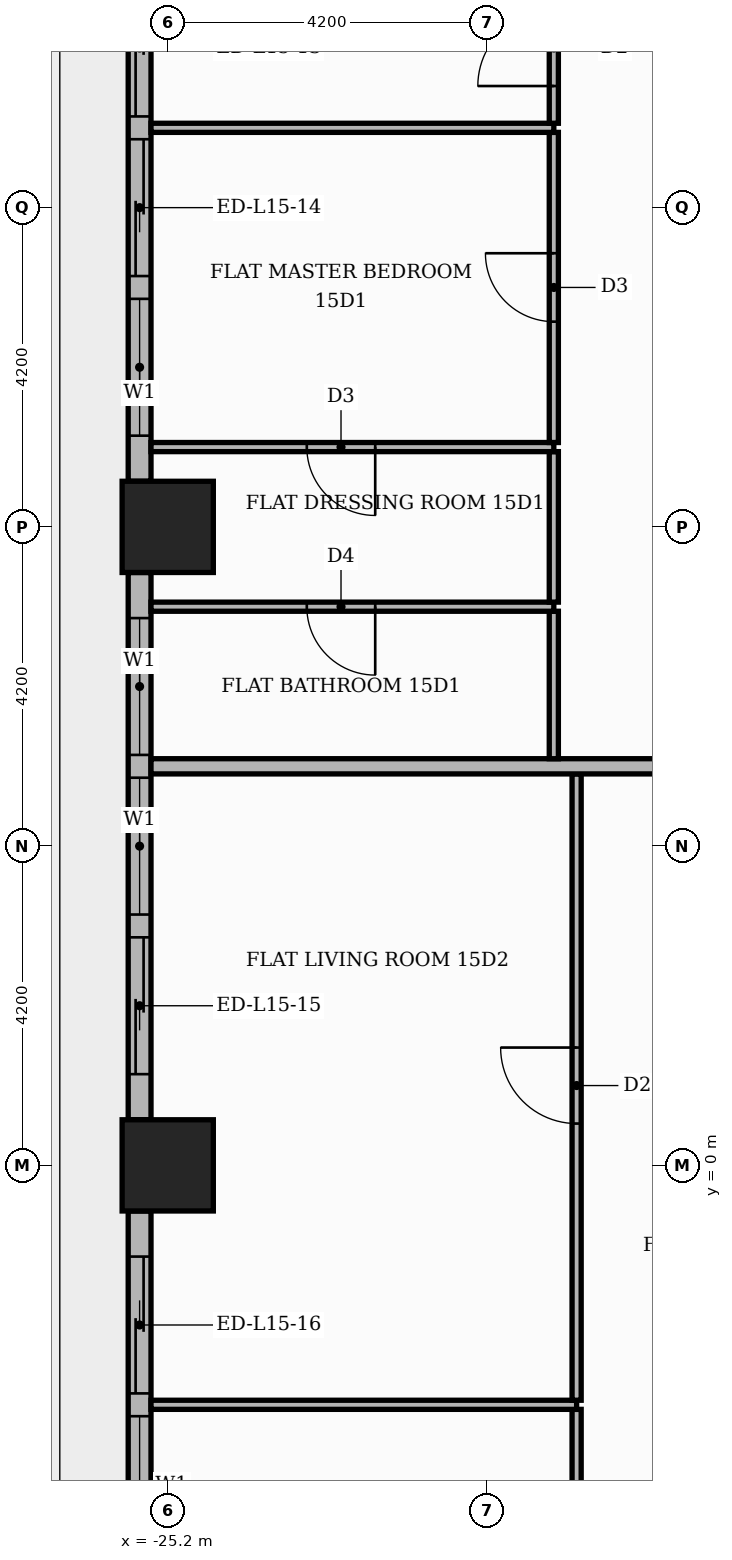
"""IFC4 building model, lengths in metres.
Left out: names, types, materials, properties, quantities, classifications, styles, units other than length and angle.
Written with IfcOpenShell. Run it as: python <this file> out.ifc"""

import sys

from ifc_helpers import new_model, si_unit, direction, frame, frame_2d, origin, origin_2d, place, context, subcontext, project, spatial, rectangle, extrude, element, fill, save


model = new_model("IFC4")
c1 = context("Model", 3, precision=1e-05, world=origin(), true_north=direction((0.0, 1.0)))
c2 = subcontext(c1, "Body", "Model", "MODEL_VIEW")
j1 = project(units=[si_unit("LENGTHUNIT", "METRE"), si_unit("PLANEANGLEUNIT", "RADIAN")], contexts=[c1])
p1 = place(None, origin())
s1 = spatial("IfcSite", under=j1, at=p1, CompositionType="ELEMENT")
p2 = place(p1, origin())
s2 = spatial("IfcBuilding", under=s1, at=p2, CompositionType="ELEMENT")
p3 = place(p2, frame((0.0, 0.0, 66.0)))
s3 = spatial("IfcBuildingStorey", under=s2, at=p3, CompositionType="ELEMENT", Elevation=66.0)
for number, where, z_axis, x_axis in (
    (1, (-25.2, 0.0, 0.0), (0.0, 0.0, 1.0), (1.0, 0.0, 0.0)),
    (2, (-25.2, 8.4, 0.0), (0.0, 0.0, 1.0), (1.0, 0.0, 0.0)),
):
    element("IfcColumn", number, at=place(p3, frame(where, z_axis=z_axis, x_axis=x_axis)), inside=s3, PredefinedType="COLUMN", context=c2, shape_type="SweptSolid", body=[
        extrude(rectangle(XDim=1.2, YDim=1.2, at=origin_2d()), origin(), (0.0, 0.0, 1.0), 3.9),
    ])
p4 = place(p3, frame((-25.57, 16.2, 0.0), z_axis=(0.0, 0.0, 1.0), x_axis=(0.0, -1.0, 0.0)))
e3 = element("IfcWall", 3, at=p4, inside=s3, PredefinedType="STANDARD", context=c2, shape_type="SweptSolid", body=[
    extrude(rectangle(XDim=7.2, YDim=0.3, at=frame_2d((3.6, 0.0))), origin(), (0.0, 0.0, 1.0), 3.48),
])
p5 = place(p4, frame((0.6, 0.0, 0.0)))
e4 = element("IfcOpeningElement", 4, at=p5, cuts=e3, PredefinedType="OPENING", context=c2, shape_type="SweptSolid", body=[
    extrude(rectangle(XDim=1.8, YDim=2.4, at=frame_2d((0.9, 1.2))), frame((0.0, 0.16, 0.0), z_axis=(0.0, -1.0, 0.0), x_axis=(1.0, 0.0, 0.0)), (0.0, 0.0, 1.0), 0.32),
])
p6 = place(p4, frame((2.7, 0.0, 0.0)))
e5 = element("IfcOpeningElement", 5, at=p6, cuts=e3, PredefinedType="OPENING", context=c2, shape_type="SweptSolid", body=[
    extrude(rectangle(XDim=1.8, YDim=2.4, at=frame_2d((0.9, 1.2))), frame((0.0, 0.16, 0.0), z_axis=(0.0, -1.0, 0.0), x_axis=(1.0, 0.0, 0.0)), (0.0, 0.0, 1.0), 0.32),
])
p7 = place(p4, frame((4.8, 0.0, 0.9)))
e6 = element("IfcOpeningElement", 6, at=p7, cuts=e3, PredefinedType="OPENING", context=c2, shape_type="SweptSolid", body=[
    extrude(rectangle(XDim=1.8, YDim=2.1, at=frame_2d((0.9, 1.05))), frame((0.0, 0.16, 0.0), z_axis=(0.0, -1.0, 0.0), x_axis=(1.0, 0.0, 0.0)), (0.0, 0.0, 1.0), 0.32),
])
p8 = place(p3, frame((-25.57, 7.8, 0.0), z_axis=(0.0, 0.0, 1.0), x_axis=(0.0, -1.0, 0.0)))
e7 = element("IfcWall", 7, at=p8, inside=s3, PredefinedType="STANDARD", context=c2, shape_type="SweptSolid", body=[
    extrude(rectangle(XDim=7.2, YDim=0.3, at=frame_2d((3.6, 0.0))), origin(), (0.0, 0.0, 1.0), 3.48),
])
p9 = place(p8, frame((0.6, 0.0, 0.9)))
e8 = element("IfcOpeningElement", 8, at=p9, cuts=e7, PredefinedType="OPENING", context=c2, shape_type="SweptSolid", body=[
    extrude(rectangle(XDim=1.8, YDim=2.1, at=frame_2d((0.9, 1.05))), frame((0.0, 0.16, 0.0), z_axis=(0.0, -1.0, 0.0), x_axis=(1.0, 0.0, 0.0)), (0.0, 0.0, 1.0), 0.32),
])
p10 = place(p8, frame((2.7, 0.0, 0.9)))
e9 = element("IfcOpeningElement", 9, at=p10, cuts=e7, PredefinedType="OPENING", context=c2, shape_type="SweptSolid", body=[
    extrude(rectangle(XDim=1.8, YDim=2.1, at=frame_2d((0.9, 1.05))), frame((0.0, 0.16, 0.0), z_axis=(0.0, -1.0, 0.0), x_axis=(1.0, 0.0, 0.0)), (0.0, 0.0, 1.0), 0.32),
])
p11 = place(p8, frame((4.8, 0.0, 0.0)))
e10 = element("IfcOpeningElement", 10, at=p11, cuts=e7, PredefinedType="OPENING", context=c2, shape_type="SweptSolid", body=[
    extrude(rectangle(XDim=1.8, YDim=2.4, at=frame_2d((0.9, 1.2))), frame((0.0, 0.16, 0.0), z_axis=(0.0, -1.0, 0.0), x_axis=(1.0, 0.0, 0.0)), (0.0, 0.0, 1.0), 0.32),
])
p12 = place(p3, frame((-25.57, -0.6, 0.0), z_axis=(0.0, 0.0, 1.0), x_axis=(0.0, -1.0, 0.0)))
e11 = element("IfcWall", 11, at=p12, inside=s3, PredefinedType="STANDARD", context=c2, shape_type="SweptSolid", body=[
    extrude(rectangle(XDim=7.2, YDim=0.3, at=frame_2d((3.6, 0.0))), origin(), (0.0, 0.0, 1.0), 3.48),
])
p13 = place(p12, frame((0.6, 0.0, 0.0)))
e12 = element("IfcOpeningElement", 12, at=p13, cuts=e11, PredefinedType="OPENING", context=c2, shape_type="SweptSolid", body=[
    extrude(rectangle(XDim=1.8, YDim=2.4, at=frame_2d((0.9, 1.2))), frame((0.0, 0.16, 0.0), z_axis=(0.0, -1.0, 0.0), x_axis=(1.0, 0.0, 0.0)), (0.0, 0.0, 1.0), 0.32),
])
p14 = place(p12, frame((2.7, 0.0, 0.9)))
e13 = element("IfcOpeningElement", 13, at=p14, cuts=e11, PredefinedType="OPENING", context=c2, shape_type="SweptSolid", body=[
    extrude(rectangle(XDim=1.8, YDim=2.1, at=frame_2d((0.9, 1.05))), frame((0.0, 0.16, 0.0), z_axis=(0.0, -1.0, 0.0), x_axis=(1.0, 0.0, 0.0)), (0.0, 0.0, 1.0), 0.32),
])
p15 = place(p12, frame((4.8, 0.0, 0.0)))
e14 = element("IfcOpeningElement", 14, at=p15, cuts=e11, PredefinedType="OPENING", context=c2, shape_type="SweptSolid", body=[
    extrude(rectangle(XDim=1.8, YDim=2.4, at=frame_2d((0.9, 1.2))), frame((0.0, 0.16, 0.0), z_axis=(0.0, -1.0, 0.0), x_axis=(1.0, 0.0, 0.0)), (0.0, 0.0, 1.0), 0.32),
])
p16 = place(p3, frame((-19.82, -9.39, 0.0), z_axis=(0.0, 0.0, 1.0), x_axis=(0.0, 1.0, 0.0)))
e15 = element("IfcWall", 15, at=p16, inside=s3, PredefinedType="PARTITIONING", context=c2, shape_type="SweptSolid", body=[
    extrude(rectangle(XDim=6.18, YDim=0.12, at=frame_2d((3.09, 0.0))), origin(), (0.0, 0.0, 1.0), 3.48),
])
p17 = place(p16, frame((2.64, 0.0, 0.0)))
e16 = element("IfcOpeningElement", 16, at=p17, cuts=e15, PredefinedType="OPENING", context=c2, shape_type="SweptSolid", body=[
    extrude(rectangle(XDim=0.9, YDim=2.1, at=frame_2d((0.45, 1.05))), frame((0.0, 0.07, 0.0), z_axis=(0.0, -1.0, 0.0), x_axis=(1.0, 0.0, 0.0)), (0.0, 0.0, 1.0), 0.14),
])
p18 = place(p3, frame((-25.42, -3.15, 0.0), z_axis=(0.0, 0.0, 1.0), x_axis=(1.0, 0.0, 0.0)))
e17 = element("IfcWall", 17, at=p18, inside=s3, PredefinedType="PARTITIONING", context=c2, shape_type="SweptSolid", body=[
    extrude(rectangle(XDim=5.6, YDim=0.12, at=frame_2d((2.8, 0.0))), origin(), (0.0, 0.0, 1.0), 3.48),
])
p19 = place(p3, frame((-19.82, -3.09, 0.0), z_axis=(0.0, 0.0, 1.0), x_axis=(0.0, 1.0, 0.0)))
e18 = element("IfcWall", 18, at=p19, inside=s3, PredefinedType="PARTITIONING", context=c2, shape_type="SweptSolid", body=[
    extrude(rectangle(XDim=8.24, YDim=0.12, at=frame_2d((4.12, 0.0))), origin(), (0.0, 0.0, 1.0), 3.48),
])
p20 = place(p19, frame((3.64, 0.0, 0.0)))
e19 = element("IfcOpeningElement", 19, at=p20, cuts=e18, PredefinedType="OPENING", context=c2, shape_type="SweptSolid", body=[
    extrude(rectangle(XDim=1.0, YDim=2.1, at=frame_2d((0.5, 1.05))), frame((0.0, 0.07, 0.0), z_axis=(0.0, -1.0, 0.0), x_axis=(1.0, 0.0, 0.0)), (0.0, 0.0, 1.0), 0.14),
])
p21 = place(p3, frame((-25.42, 5.25, 0.0), z_axis=(0.0, 0.0, 1.0), x_axis=(1.0, 0.0, 0.0)))
e20 = element("IfcWall", 20, at=p21, inside=s3, PredefinedType="PARTITIONING", context=c2, shape_type="SweptSolid", body=[
    extrude(rectangle(XDim=11.77, YDim=0.2, at=frame_2d((5.885, 0.0))), origin(), (0.0, 0.0, 1.0), 3.48),
])
p22 = place(p3, frame((-20.12, 5.35, 0.0), z_axis=(0.0, 0.0, 1.0), x_axis=(0.0, 1.0, 0.0)))
e21 = element("IfcWall", 21, at=p22, inside=s3, PredefinedType="PARTITIONING", context=c2, shape_type="SweptSolid", body=[
    extrude(rectangle(XDim=1.94, YDim=0.12, at=frame_2d((0.97, 0.0))), origin(), (0.0, 0.0, 1.0), 3.48),
])
p23 = place(p3, frame((-25.42, 7.35, 0.0), z_axis=(0.0, 0.0, 1.0), x_axis=(1.0, 0.0, 0.0)))
e22 = element("IfcWall", 22, at=p23, inside=s3, PredefinedType="PARTITIONING", context=c2, shape_type="SweptSolid", body=[
    extrude(rectangle(XDim=5.3, YDim=0.12, at=frame_2d((2.65, 0.0))), origin(), (0.0, 0.0, 1.0), 3.48),
])
p24 = place(p23, frame((2.05, 0.0, 0.0)))
e23 = element("IfcOpeningElement", 23, at=p24, cuts=e22, PredefinedType="OPENING", context=c2, shape_type="SweptSolid", body=[
    extrude(rectangle(XDim=0.9, YDim=2.1, at=frame_2d((0.45, 1.05))), frame((0.0, 0.07, 0.0), z_axis=(0.0, -1.0, 0.0), x_axis=(1.0, 0.0, 0.0)), (0.0, 0.0, 1.0), 0.14),
])
p25 = place(p3, frame((-20.12, 7.41, 0.0), z_axis=(0.0, 0.0, 1.0), x_axis=(0.0, 1.0, 0.0)))
e24 = element("IfcWall", 24, at=p25, inside=s3, PredefinedType="PARTITIONING", context=c2, shape_type="SweptSolid", body=[
    extrude(rectangle(XDim=1.98, YDim=0.12, at=frame_2d((0.99, 0.0))), origin(), (0.0, 0.0, 1.0), 3.48),
])
p26 = place(p3, frame((-25.42, 9.45, 0.0), z_axis=(0.0, 0.0, 1.0), x_axis=(1.0, 0.0, 0.0)))
e25 = element("IfcWall", 25, at=p26, inside=s3, PredefinedType="PARTITIONING", context=c2, shape_type="SweptSolid", body=[
    extrude(rectangle(XDim=5.3, YDim=0.12, at=frame_2d((2.65, 0.0))), origin(), (0.0, 0.0, 1.0), 3.48),
])
p27 = place(p26, frame((2.05, 0.0, 0.0)))
e26 = element("IfcOpeningElement", 26, at=p27, cuts=e25, PredefinedType="OPENING", context=c2, shape_type="SweptSolid", body=[
    extrude(rectangle(XDim=0.9, YDim=2.1, at=frame_2d((0.45, 1.05))), frame((0.0, 0.07, 0.0), z_axis=(0.0, -1.0, 0.0), x_axis=(1.0, 0.0, 0.0)), (0.0, 0.0, 1.0), 0.14),
])
p28 = place(p3, frame((-20.12, 9.51, 0.0), z_axis=(0.0, 0.0, 1.0), x_axis=(0.0, 1.0, 0.0)))
e27 = element("IfcWall", 27, at=p28, inside=s3, PredefinedType="PARTITIONING", context=c2, shape_type="SweptSolid", body=[
    extrude(rectangle(XDim=4.08, YDim=0.12, at=frame_2d((2.04, 0.0))), origin(), (0.0, 0.0, 1.0), 3.48),
])
p29 = place(p28, frame((1.59, 0.0, 0.0)))
e28 = element("IfcOpeningElement", 28, at=p29, cuts=e27, PredefinedType="OPENING", context=c2, shape_type="SweptSolid", body=[
    extrude(rectangle(XDim=0.9, YDim=2.1, at=frame_2d((0.45, 1.05))), frame((0.0, 0.07, 0.0), z_axis=(0.0, -1.0, 0.0), x_axis=(1.0, 0.0, 0.0)), (0.0, 0.0, 1.0), 0.14),
])
p30 = place(p3, frame((-25.42, 13.65, 0.0), z_axis=(0.0, 0.0, 1.0), x_axis=(1.0, 0.0, 0.0)))
e29 = element("IfcWall", 29, at=p30, inside=s3, PredefinedType="PARTITIONING", context=c2, shape_type="SweptSolid", body=[
    extrude(rectangle(XDim=5.3, YDim=0.12, at=frame_2d((2.65, 0.0))), origin(), (0.0, 0.0, 1.0), 3.48),
])
p31 = place(p3, frame((-20.12, 13.71, 0.0), z_axis=(0.0, 0.0, 1.0), x_axis=(0.0, 1.0, 0.0)))
e30 = element("IfcWall", 30, at=p31, inside=s3, PredefinedType="PARTITIONING", context=c2, shape_type="SweptSolid", body=[
    extrude(rectangle(XDim=1.98, YDim=0.12, at=frame_2d((0.99, 0.0))), origin(), (0.0, 0.0, 1.0), 3.48),
])
p32 = place(p31, frame((0.49, 0.0, 0.0)))
e31 = element("IfcOpeningElement", 31, at=p32, cuts=e30, PredefinedType="OPENING", context=c2, shape_type="SweptSolid", body=[
    extrude(rectangle(XDim=1.0, YDim=2.1, at=frame_2d((0.5, 1.05))), frame((0.0, 0.07, 0.0), z_axis=(0.0, -1.0, 0.0), x_axis=(1.0, 0.0, 0.0)), (0.0, 0.0, 1.0), 0.14),
])
p33 = place(p5, origin())
e32 = element("IfcDoor", 32, at=p33, inside=s3, OperationType="SLIDING_TO_LEFT", PredefinedType="DOOR", context=c2, shape_type="SweptSolid", body=[
    extrude(rectangle(XDim=1.8, YDim=2.4, at=frame_2d((0.9, 1.2))), frame((0.0, 0.025, 0.0), z_axis=(0.0, -1.0, 0.0), x_axis=(1.0, 0.0, 0.0)), (0.0, 0.0, 1.0), 0.05),
])
fill(e4, e32)
p34 = place(p6, origin())
e33 = element("IfcDoor", 33, at=p34, inside=s3, OperationType="SLIDING_TO_RIGHT", PredefinedType="DOOR", context=c2, shape_type="SweptSolid", body=[
    extrude(rectangle(XDim=1.8, YDim=2.4, at=frame_2d((0.9, 1.2))), frame((0.0, 0.025, 0.0), z_axis=(0.0, -1.0, 0.0), x_axis=(1.0, 0.0, 0.0)), (0.0, 0.0, 1.0), 0.05),
])
fill(e5, e33)
p35 = place(p7, origin())
e34 = element("IfcWindow", 34, at=p35, inside=s3, PartitioningType="SINGLE_PANEL", PredefinedType="WINDOW", context=c2, shape_type="SweptSolid", body=[
    extrude(rectangle(XDim=1.8, YDim=2.1, at=frame_2d((0.9, 1.05))), frame((0.0, 0.03, 0.0), z_axis=(0.0, -1.0, 0.0), x_axis=(1.0, 0.0, 0.0)), (0.0, 0.0, 1.0), 0.06),
])
fill(e6, e34)
p36 = place(p9, origin())
e35 = element("IfcWindow", 35, at=p36, inside=s3, PartitioningType="SINGLE_PANEL", PredefinedType="WINDOW", context=c2, shape_type="SweptSolid", body=[
    extrude(rectangle(XDim=1.8, YDim=2.1, at=frame_2d((0.9, 1.05))), frame((0.0, 0.03, 0.0), z_axis=(0.0, -1.0, 0.0), x_axis=(1.0, 0.0, 0.0)), (0.0, 0.0, 1.0), 0.06),
])
fill(e8, e35)
p37 = place(p10, origin())
e36 = element("IfcWindow", 36, at=p37, inside=s3, PartitioningType="SINGLE_PANEL", PredefinedType="WINDOW", context=c2, shape_type="SweptSolid", body=[
    extrude(rectangle(XDim=1.8, YDim=2.1, at=frame_2d((0.9, 1.05))), frame((0.0, 0.03, 0.0), z_axis=(0.0, -1.0, 0.0), x_axis=(1.0, 0.0, 0.0)), (0.0, 0.0, 1.0), 0.06),
])
fill(e9, e36)
p38 = place(p11, origin())
e37 = element("IfcDoor", 37, at=p38, inside=s3, OperationType="SLIDING_TO_RIGHT", PredefinedType="DOOR", context=c2, shape_type="SweptSolid", body=[
    extrude(rectangle(XDim=1.8, YDim=2.4, at=frame_2d((0.9, 1.2))), frame((0.0, 0.025, 0.0), z_axis=(0.0, -1.0, 0.0), x_axis=(1.0, 0.0, 0.0)), (0.0, 0.0, 1.0), 0.05),
])
fill(e10, e37)
p39 = place(p13, origin())
e38 = element("IfcDoor", 38, at=p39, inside=s3, OperationType="SLIDING_TO_LEFT", PredefinedType="DOOR", context=c2, shape_type="SweptSolid", body=[
    extrude(rectangle(XDim=1.8, YDim=2.4, at=frame_2d((0.9, 1.2))), frame((0.0, 0.025, 0.0), z_axis=(0.0, -1.0, 0.0), x_axis=(1.0, 0.0, 0.0)), (0.0, 0.0, 1.0), 0.05),
])
fill(e12, e38)
p40 = place(p14, origin())
e39 = element("IfcWindow", 39, at=p40, inside=s3, PartitioningType="SINGLE_PANEL", PredefinedType="WINDOW", context=c2, shape_type="SweptSolid", body=[
    extrude(rectangle(XDim=1.8, YDim=2.1, at=frame_2d((0.9, 1.05))), frame((0.0, 0.03, 0.0), z_axis=(0.0, -1.0, 0.0), x_axis=(1.0, 0.0, 0.0)), (0.0, 0.0, 1.0), 0.06),
])
fill(e13, e39)
p41 = place(p32, origin())
e40 = element("IfcDoor", 40, at=p41, inside=s3, OperationType="SINGLE_SWING_LEFT", PredefinedType="DOOR", context=c2, shape_type="SweptSolid", body=[
    extrude(rectangle(XDim=1.0, YDim=2.1, at=frame_2d((0.5, 1.05))), frame((0.0, 0.025, 0.0), z_axis=(0.0, -1.0, 0.0), x_axis=(1.0, 0.0, 0.0)), (0.0, 0.0, 1.0), 0.05),
])
fill(e31, e40)
p42 = place(p29, origin())
e41 = element("IfcDoor", 41, at=p42, inside=s3, OperationType="SINGLE_SWING_RIGHT", PredefinedType="DOOR", context=c2, shape_type="SweptSolid", body=[
    extrude(rectangle(XDim=0.9, YDim=2.1, at=frame_2d((0.45, 1.05))), frame((0.0, 0.025, 0.0), z_axis=(0.0, -1.0, 0.0), x_axis=(1.0, 0.0, 0.0)), (0.0, 0.0, 1.0), 0.05),
])
fill(e28, e41)
p43 = place(p27, frame((0.9, 0.0, 0.0), z_axis=(0.0, 0.0, 1.0), x_axis=(-1.0, 0.0, 0.0)))
e42 = element("IfcDoor", 42, at=p43, inside=s3, OperationType="SINGLE_SWING_RIGHT", PredefinedType="DOOR", context=c2, shape_type="SweptSolid", body=[
    extrude(rectangle(XDim=0.9, YDim=2.1, at=frame_2d((0.45, 1.05))), frame((0.0, 0.025, 0.0), z_axis=(0.0, -1.0, 0.0), x_axis=(1.0, 0.0, 0.0)), (0.0, 0.0, 1.0), 0.05),
])
fill(e26, e42)
p44 = place(p24, frame((0.9, 0.0, 0.0), z_axis=(0.0, 0.0, 1.0), x_axis=(-1.0, 0.0, 0.0)))
e43 = element("IfcDoor", 43, at=p44, inside=s3, OperationType="SINGLE_SWING_RIGHT", PredefinedType="DOOR", context=c2, shape_type="SweptSolid", body=[
    extrude(rectangle(XDim=0.9, YDim=2.1, at=frame_2d((0.45, 1.05))), frame((0.0, 0.025, 0.0), z_axis=(0.0, -1.0, 0.0), x_axis=(1.0, 0.0, 0.0)), (0.0, 0.0, 1.0), 0.05),
])
fill(e23, e43)
p45 = place(p20, origin())
e44 = element("IfcDoor", 44, at=p45, inside=s3, OperationType="SINGLE_SWING_RIGHT", PredefinedType="DOOR", context=c2, shape_type="SweptSolid", body=[
    extrude(rectangle(XDim=1.0, YDim=2.1, at=frame_2d((0.5, 1.05))), frame((0.0, 0.025, 0.0), z_axis=(0.0, -1.0, 0.0), x_axis=(1.0, 0.0, 0.0)), (0.0, 0.0, 1.0), 0.05),
])
fill(e19, e44)
save(model, sys.argv[1])
